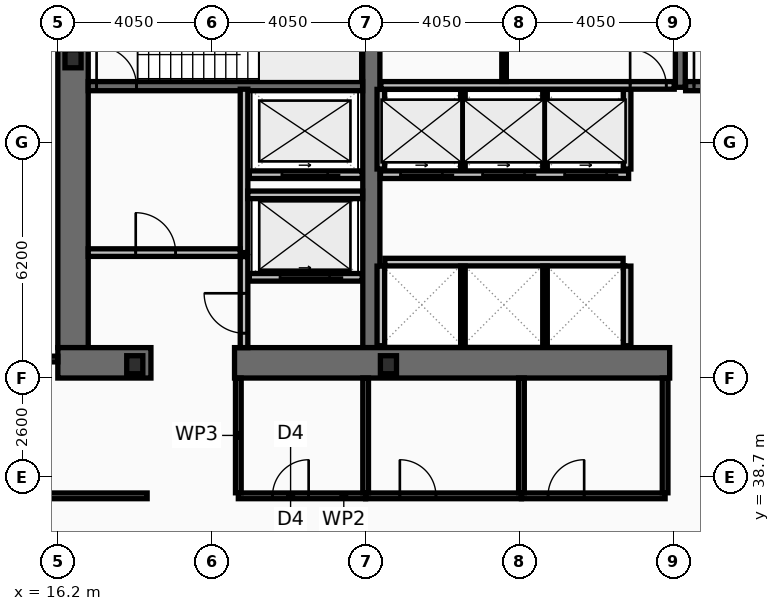
"""IFC4 building model, lengths in metres.
Left out: names, types, materials, properties, quantities, classifications, styles, units other than length and angle.
Written with IfcOpenShell. Run it as: python <this file> out.ifc"""

import sys

from ifc_helpers import new_model, si_unit, direction, frame, frame_2d, origin, origin_2d, place, context, subcontext, project, spatial, rectangle, i_section, extrude, element, fill, save


model = new_model("IFC4")
c1 = context("Model", 3, precision=1e-05, world=origin(), true_north=direction((0.0, 1.0)))
c2 = subcontext(c1, "Body", "Model", "MODEL_VIEW")
j1 = project(units=[si_unit("LENGTHUNIT", "METRE"), si_unit("PLANEANGLEUNIT", "RADIAN")], contexts=[c1])
p1 = place(None, origin())
s1 = spatial("IfcSite", under=j1, at=p1, CompositionType="ELEMENT")
p2 = place(p1, origin())
s2 = spatial("IfcBuilding", under=s1, at=p2, CompositionType="ELEMENT")
p3 = place(p2, frame((0.0, 0.0, 29.8)))
s3 = spatial("IfcBuildingStorey", under=s2, at=p3, CompositionType="ELEMENT", Elevation=29.8)
p4 = place(p3, frame((16.6, 42.1, 0.0), z_axis=(0.0, 0.0, 1.0), x_axis=(0.0, 1.0, 0.0)))
e1 = element("IfcWall", 1, at=p4, inside=s3, PredefinedType="SHEAR", context=c2, shape_type="SweptSolid", body=[
    extrude(rectangle(XDim=10.8, YDim=0.8, at=frame_2d((5.4, 0.0))), origin(), (0.0, 0.0, 1.0), 3.82),
])
p5 = place(p3, frame((24.45, 42.1, 0.0), z_axis=(0.0, 0.0, 1.0), x_axis=(0.0, 1.0, 0.0)))
e2 = element("IfcWall", 2, at=p5, inside=s3, PredefinedType="SHEAR", context=c2, shape_type="SweptSolid", body=[
    extrude(rectangle(XDim=10.8, YDim=0.45, at=frame_2d((5.4, 0.0))), origin(), (0.0, 0.0, 1.0), 3.82),
])
p6 = place(p3, frame((18.65, 41.7, 0.0), z_axis=(0.0, 0.0, 1.0), x_axis=(-1.0, 0.0, 0.0)))
e3 = element("IfcWall", 3, at=p6, inside=s3, PredefinedType="SHEAR", context=c2, shape_type="SweptSolid", body=[
    extrude(rectangle(XDim=2.45, YDim=0.8, at=frame_2d((1.225, 0.0))), origin(), (0.0, 0.0, 1.0), 3.82),
])
p7 = place(p3, frame((32.3, 41.7, 0.0), z_axis=(0.0, 0.0, 1.0), x_axis=(-1.0, 0.0, 0.0)))
e4 = element("IfcWall", 4, at=p7, inside=s3, PredefinedType="SHEAR", context=c2, shape_type="SweptSolid", body=[
    extrude(rectangle(XDim=11.45, YDim=0.8, at=frame_2d((5.725, 0.0))), origin(), (0.0, 0.0, 1.0), 3.82),
])
p8 = place(p3, frame((32.58, 48.95, 0.0), z_axis=(0.0, 0.0, 1.0), x_axis=(0.0, 1.0, 0.0)))
e5 = element("IfcWall", 5, at=p8, inside=s3, PredefinedType="SHEAR", context=c2, shape_type="SweptSolid", body=[
    extrude(rectangle(XDim=3.95, YDim=0.26, at=frame_2d((1.975, 0.0))), origin(), (0.0, 0.0, 1.0), 3.82),
])
p9 = place(p3, frame((17.0, 48.98, 0.0), z_axis=(0.0, 0.0, 1.0), x_axis=(1.0, 0.0, 0.0)))
e6 = element("IfcWall", 6, at=p9, inside=s3, PredefinedType="SHEAR", context=c2, shape_type="SweptSolid", body=[
    extrude(rectangle(XDim=7.22, YDim=0.24, at=frame_2d((3.61, 0.0))), origin(), (0.0, 0.0, 1.0), 3.82),
])
p10 = place(p9, frame((0.22, 0.0, 0.0)))
e7 = element("IfcOpeningElement", 7, at=p10, cuts=e6, PredefinedType="OPENING", context=c2, shape_type="SweptSolid", body=[
    extrude(rectangle(XDim=1.05, YDim=2.15, at=frame_2d((0.525, 1.075))), frame((0.0, 0.13, 0.0), z_axis=(0.0, -1.0, 0.0), x_axis=(1.0, 0.0, 0.0)), (0.0, 0.0, 1.0), 0.26),
])
p11 = place(p3, frame((32.72, 48.98, 0.0), z_axis=(0.0, 0.0, 1.0), x_axis=(1.0, 0.0, 0.0)))
e8 = element("IfcWall", 8, at=p11, inside=s3, PredefinedType="SHEAR", context=c2, shape_type="SweptSolid", body=[
    extrude(rectangle(XDim=7.56, YDim=0.24, at=frame_2d((3.78, 0.0))), origin(), (0.0, 0.0, 1.0), 3.82),
])
p12 = place(p11, frame((0.22, 0.0, 0.0)))
e9 = element("IfcOpeningElement", 9, at=p12, cuts=e8, PredefinedType="OPENING", context=c2, shape_type="SweptSolid", body=[
    extrude(rectangle(XDim=1.05, YDim=2.15, at=frame_2d((0.525, 1.075))), frame((0.0, 0.13, 0.0), z_axis=(0.0, -1.0, 0.0), x_axis=(1.0, 0.0, 0.0)), (0.0, 0.0, 1.0), 0.26),
])
for number, where, z_axis, x_axis in (
    (10, (16.6, 49.7, 0.0), (0.0, 0.0, 1.0), (1.0, 0.0, 0.0)),
    (11, (18.225, 41.65, 0.0), (0.0, 0.0, 1.0), (1.0, 0.0, 0.0)),
    (12, (24.9, 41.65, 0.0), (0.0, 0.0, 1.0), (1.0, 0.0, 0.0)),
):
    element("IfcColumn", number, at=place(p3, frame(where, z_axis=z_axis, x_axis=x_axis)), inside=s3, PredefinedType="COLUMN", context=c2, shape_type="SweptSolid", body=[
        extrude(i_section(OverallWidth=0.424, OverallDepth=0.474, WebThickness=0.048, FlangeThickness=0.077, at=origin_2d()), origin(), (0.0, 0.0, 1.0), 4.0),
    ])
p13 = place(p3, frame((24.21, 43.95, 0.0), z_axis=(0.0, 0.0, 1.0), x_axis=(-1.0, 0.0, 0.0)))
e13 = element("IfcWall", 13, at=p13, inside=s3, PredefinedType="PARTITIONING", context=c2, shape_type="SweptSolid", body=[
    extrude(rectangle(XDim=2.97, YDim=0.2, at=frame_2d((1.485, 0.0))), origin(), (0.0, 0.0, 1.0), 3.82),
])
p14 = place(p13, frame((0.86, 0.0, 0.0)))
e14 = element("IfcOpeningElement", 14, at=p14, cuts=e13, PredefinedType="OPENING", context=c2, shape_type="SweptSolid", body=[
    extrude(rectangle(XDim=1.3, YDim=2.18, at=frame_2d((0.65, 1.09))), frame((0.0, 0.11, 0.0), z_axis=(0.0, -1.0, 0.0), x_axis=(1.0, 0.0, 0.0)), (0.0, 0.0, 1.0), 0.22),
])
p15 = place(p3, frame((24.21, 46.65, 0.0), z_axis=(0.0, 0.0, 1.0), x_axis=(-1.0, 0.0, 0.0)))
e15 = element("IfcWall", 15, at=p15, inside=s3, PredefinedType="PARTITIONING", context=c2, shape_type="SweptSolid", body=[
    extrude(rectangle(XDim=2.97, YDim=0.2, at=frame_2d((1.485, 0.0))), origin(), (0.0, 0.0, 1.0), 3.82),
])
p16 = place(p15, frame((0.91, 0.0, 0.0)))
e16 = element("IfcOpeningElement", 16, at=p16, cuts=e15, PredefinedType="OPENING", context=c2, shape_type="SweptSolid", body=[
    extrude(rectangle(XDim=1.2, YDim=2.18, at=frame_2d((0.6, 1.09))), frame((0.0, 0.11, 0.0), z_axis=(0.0, -1.0, 0.0), x_axis=(1.0, 0.0, 0.0)), (0.0, 0.0, 1.0), 0.22),
])
p17 = place(p3, frame((31.22, 46.65, 0.0), z_axis=(0.0, 0.0, 1.0), x_axis=(-1.0, 0.0, 0.0)))
e17 = element("IfcWall", 17, at=p17, inside=s3, PredefinedType="PARTITIONING", context=c2, shape_type="SweptSolid", body=[
    extrude(rectangle(XDim=6.53, YDim=0.2, at=frame_2d((3.265, 0.0))), origin(), (0.0, 0.0, 1.0), 3.82),
])
p18 = place(p17, frame((4.9, 0.0, 0.0)))
e18 = element("IfcOpeningElement", 18, at=p18, cuts=e17, PredefinedType="OPENING", context=c2, shape_type="SweptSolid", body=[
    extrude(rectangle(XDim=1.1, YDim=2.18, at=frame_2d((0.55, 1.09))), frame((0.0, 0.11, 0.0), z_axis=(0.0, -1.0, 0.0), x_axis=(1.0, 0.0, 0.0)), (0.0, 0.0, 1.0), 0.22),
])
p19 = place(p17, frame((2.74, 0.0, 0.0)))
e19 = element("IfcOpeningElement", 19, at=p19, cuts=e17, PredefinedType="OPENING", context=c2, shape_type="SweptSolid", body=[
    extrude(rectangle(XDim=1.1, YDim=2.18, at=frame_2d((0.55, 1.09))), frame((0.0, 0.11, 0.0), z_axis=(0.0, -1.0, 0.0), x_axis=(1.0, 0.0, 0.0)), (0.0, 0.0, 1.0), 0.22),
])
p20 = place(p17, frame((0.58, 0.0, 0.0)))
e20 = element("IfcOpeningElement", 20, at=p20, cuts=e17, PredefinedType="OPENING", context=c2, shape_type="SweptSolid", body=[
    extrude(rectangle(XDim=1.1, YDim=2.18, at=frame_2d((0.55, 1.09))), frame((0.0, 0.11, 0.0), z_axis=(0.0, -1.0, 0.0), x_axis=(1.0, 0.0, 0.0)), (0.0, 0.0, 1.0), 0.22),
])
p21 = place(p3, frame((21.1, 44.6, 0.0), z_axis=(0.0, 0.0, 1.0), x_axis=(0.0, 1.0, 0.0)))
e21 = element("IfcWall", 21, at=p21, inside=s3, PredefinedType="PARTITIONING", context=c2, shape_type="SweptSolid", body=[
    extrude(rectangle(XDim=4.3, YDim=0.2, at=frame_2d((2.15, 0.0))), origin(), (0.0, 0.0, 1.0), 3.82),
])
p22 = place(p3, frame((17.0, 44.6, 0.0), z_axis=(0.0, 0.0, 1.0), x_axis=(1.0, 0.0, 0.0)))
e22 = element("IfcWall", 22, at=p22, inside=s3, PredefinedType="PARTITIONING", context=c2, shape_type="SweptSolid", body=[
    extrude(rectangle(XDim=4.0, YDim=0.2, at=frame_2d((2.0, 0.0))), origin(), (0.0, 0.0, 1.0), 3.82),
])
p23 = place(p22, frame((1.25, 0.0, 0.0)))
e23 = element("IfcOpeningElement", 23, at=p23, cuts=e22, PredefinedType="OPENING", context=c2, shape_type="SweptSolid", body=[
    extrude(rectangle(XDim=1.05, YDim=2.15, at=frame_2d((0.525, 1.075))), frame((0.0, 0.11, 0.0), z_axis=(0.0, -1.0, 0.0), x_axis=(1.0, 0.0, 0.0)), (0.0, 0.0, 1.0), 0.22),
])
p24 = place(p3, frame((21.2, 46.12, 0.0), z_axis=(0.0, 0.0, 1.0), x_axis=(1.0, 0.0, 0.0)))
e24 = element("IfcWall", 24, at=p24, inside=s3, PredefinedType="PARTITIONING", context=c2, shape_type="SweptSolid", body=[
    extrude(rectangle(XDim=3.02, YDim=0.2, at=frame_2d((1.51, 0.0))), origin(), (0.0, 0.0, 1.0), 3.82),
])
p25 = place(p3, frame((21.1, 42.1, 0.0), z_axis=(0.0, 0.0, 1.0), x_axis=(0.0, 1.0, 0.0)))
e25 = element("IfcWall", 25, at=p25, inside=s3, PredefinedType="PARTITIONING", context=c2, shape_type="SweptSolid", body=[
    extrude(rectangle(XDim=2.395, YDim=0.2, at=frame_2d((1.198, 0.0))), origin(), (0.0, 0.0, 1.0), 3.82),
])
p26 = place(p25, frame((0.38, 0.0, 0.0)))
e26 = element("IfcOpeningElement", 26, at=p26, cuts=e25, PredefinedType="OPENING", context=c2, shape_type="SweptSolid", body=[
    extrude(rectangle(XDim=1.05, YDim=2.15, at=frame_2d((0.525, 1.075))), frame((0.0, 0.11, 0.0), z_axis=(0.0, -1.0, 0.0), x_axis=(1.0, 0.0, 0.0)), (0.0, 0.0, 1.0), 0.22),
])
for number, where, z_axis, x_axis in (
    (27, (24.7, 46.8, 0.0), (0.0, 0.0, 1.0), (0.0, 1.0, 0.0)),
    (28, (31.18, 46.8, 0.0), (0.0, 0.0, 1.0), (0.0, 1.0, 0.0)),
):
    element("IfcWall", number, at=place(p3, frame(where, z_axis=z_axis, x_axis=x_axis)), inside=s3, PredefinedType="PARTITIONING", context=c2, shape_type="SweptSolid", body=[
        extrude(rectangle(XDim=2.095, YDim=0.2, at=frame_2d((1.047, 0.0))), origin(), (0.0, 0.0, 1.0), 3.82),
    ])
for number, where, z_axis, x_axis in (
    (29, (26.86, 46.8, 0.0), (0.0, 0.0, 1.0), (0.0, 1.0, 0.0)),
    (30, (29.02, 46.8, 0.0), (0.0, 0.0, 1.0), (0.0, 1.0, 0.0)),
):
    element("IfcWall", number, at=place(p3, frame(where, z_axis=z_axis, x_axis=x_axis)), inside=s3, PredefinedType="PARTITIONING", context=c2, shape_type="SweptSolid", body=[
        extrude(rectangle(XDim=2.095, YDim=0.12, at=frame_2d((1.047, 0.0))), origin(), (0.0, 0.0, 1.0), 3.82),
    ])
p27 = place(p3, frame((24.805, 44.35, 0.0), z_axis=(0.0, 0.0, 1.0), x_axis=(1.0, 0.0, 0.0)))
e31 = element("IfcWall", 31, at=p27, inside=s3, PredefinedType="PARTITIONING", context=c2, shape_type="SweptSolid", body=[
    extrude(rectangle(XDim=6.27, YDim=0.2, at=frame_2d((3.135, 0.0))), origin(), (0.0, 0.0, 1.0), 3.82),
])
for number, where, z_axis, x_axis in (
    (32, (24.7, 42.15, 0.0), (0.0, 0.0, 1.0), (0.0, 1.0, 0.0)),
    (33, (31.18, 42.15, 0.0), (0.0, 0.0, 1.0), (0.0, 1.0, 0.0)),
):
    element("IfcWall", number, at=place(p3, frame(where, z_axis=z_axis, x_axis=x_axis)), inside=s3, PredefinedType="PARTITIONING", context=c2, shape_type="SweptSolid", body=[
        extrude(rectangle(XDim=2.095, YDim=0.2, at=frame_2d((1.048, 0.0))), origin(), (0.0, 0.0, 1.0), 3.82),
    ])
for number, where, z_axis, x_axis in (
    (34, (26.86, 42.15, 0.0), (0.0, 0.0, 1.0), (0.0, 1.0, 0.0)),
    (35, (29.02, 42.15, 0.0), (0.0, 0.0, 1.0), (0.0, 1.0, 0.0)),
):
    element("IfcWall", number, at=place(p3, frame(where, z_axis=z_axis, x_axis=x_axis)), inside=s3, PredefinedType="PARTITIONING", context=c2, shape_type="SweptSolid", body=[
        extrude(rectangle(XDim=2.095, YDim=0.12, at=frame_2d((1.048, 0.0))), origin(), (0.0, 0.0, 1.0), 3.82),
    ])
p28 = place(p3, frame((24.7, 49.0, 0.0), z_axis=(0.0, 0.0, 1.0), x_axis=(1.0, 0.0, 0.0)))
e36 = element("IfcWall", 36, at=p28, inside=s3, PredefinedType="PARTITIONING", context=c2, shape_type="SweptSolid", body=[
    extrude(rectangle(XDim=7.72, YDim=0.2, at=frame_2d((3.86, 0.0))), origin(), (0.0, 0.0, 1.0), 3.82),
])
p29 = place(p28, frame((6.56, 0.0, 0.0)))
e37 = element("IfcOpeningElement", 37, at=p29, cuts=e36, PredefinedType="OPENING", context=c2, shape_type="SweptSolid", body=[
    extrude(rectangle(XDim=0.95, YDim=2.1, at=frame_2d((0.475, 1.05))), frame((0.0, 0.11, 0.0), z_axis=(0.0, -1.0, 0.0), x_axis=(1.0, 0.0, 0.0)), (0.0, 0.0, 1.0), 0.22),
])
p30 = place(p3, frame((27.942, 49.105, 0.0), z_axis=(0.0, 0.0, 1.0), x_axis=(0.0, 1.0, 0.0)))
e38 = element("IfcWall", 38, at=p30, inside=s3, PredefinedType="PARTITIONING", context=c2, shape_type="SweptSolid", body=[
    extrude(rectangle(XDim=3.69, YDim=0.12, at=frame_2d((1.845, 0.0))), origin(), (0.0, 0.0, 1.0), 3.82),
])
p31 = place(p30, frame((1.05, 0.0, 0.0)))
e39 = element("IfcOpeningElement", 39, at=p31, cuts=e38, PredefinedType="OPENING", context=c2, shape_type="SweptSolid", body=[
    extrude(rectangle(XDim=0.9, YDim=2.05, at=frame_2d((0.45, 1.025))), frame((0.0, 0.07, 0.0), z_axis=(0.0, -1.0, 0.0), x_axis=(1.0, 0.0, 0.0)), (0.0, 0.0, 1.0), 0.14),
])
p32 = place(p3, frame((20.95, 38.2, 0.0), z_axis=(0.0, 0.0, 1.0), x_axis=(1.0, 0.0, 0.0)))
e40 = element("IfcWall", 40, at=p32, inside=s3, PredefinedType="PARTITIONING", context=c2, shape_type="SweptSolid", body=[
    extrude(rectangle(XDim=3.35, YDim=0.15, at=frame_2d((1.675, 0.0))), origin(), (0.0, 0.0, 1.0), 3.82),
])
p33 = place(p32, frame((0.9, 0.0, 0.0)))
e41 = element("IfcOpeningElement", 41, at=p33, cuts=e40, PredefinedType="OPENING", context=c2, shape_type="SweptSolid", body=[
    extrude(rectangle(XDim=0.95, YDim=2.05, at=frame_2d((0.475, 1.025))), frame((0.0, 0.085, 0.0), z_axis=(0.0, -1.0, 0.0), x_axis=(1.0, 0.0, 0.0)), (0.0, 0.0, 1.0), 0.17),
])
p34 = place(p3, frame((24.3, 38.2, 0.0), z_axis=(0.0, 0.0, 1.0), x_axis=(1.0, 0.0, 0.0)))
e42 = element("IfcWall", 42, at=p34, inside=s3, PredefinedType="PARTITIONING", context=c2, shape_type="SweptSolid", body=[
    extrude(rectangle(XDim=4.1, YDim=0.15, at=frame_2d((2.05, 0.0))), origin(), (0.0, 0.0, 1.0), 3.01),
])
p35 = place(p34, frame((0.9, 0.0, 0.0)))
e43 = element("IfcOpeningElement", 43, at=p35, cuts=e42, PredefinedType="OPENING", context=c2, shape_type="SweptSolid", body=[
    extrude(rectangle(XDim=0.95, YDim=2.05, at=frame_2d((0.475, 1.025))), frame((0.0, 0.085, 0.0), z_axis=(0.0, -1.0, 0.0), x_axis=(1.0, 0.0, 0.0)), (0.0, 0.0, 1.0), 0.17),
])
p36 = place(p3, frame((28.4, 38.2, 0.0), z_axis=(0.0, 0.0, 1.0), x_axis=(1.0, 0.0, 0.0)))
e44 = element("IfcWall", 44, at=p36, inside=s3, PredefinedType="PARTITIONING", context=c2, shape_type="SweptSolid", body=[
    extrude(rectangle(XDim=3.78, YDim=0.15, at=frame_2d((1.89, 0.0))), origin(), (0.0, 0.0, 1.0), 3.01),
])
p37 = place(p36, frame((0.7, 0.0, 0.0)))
e45 = element("IfcOpeningElement", 45, at=p37, cuts=e44, PredefinedType="OPENING", context=c2, shape_type="SweptSolid", body=[
    extrude(rectangle(XDim=0.95, YDim=2.05, at=frame_2d((0.475, 1.025))), frame((0.0, 0.085, 0.0), z_axis=(0.0, -1.0, 0.0), x_axis=(1.0, 0.0, 0.0)), (0.0, 0.0, 1.0), 0.17),
])
for number, where, z_axis, x_axis in (
    (46, (20.95, 38.28, 0.0), (0.0, 0.0, 1.0), (0.0, 1.0, 0.0)),
    (47, (24.3, 38.28, 0.0), (0.0, 0.0, 1.0), (0.0, 1.0, 0.0)),
    (48, (28.4, 38.28, 0.0), (0.0, 0.0, 1.0), (0.0, 1.0, 0.0)),
    (49, (32.18, 38.28, 0.0), (0.0, 0.0, 1.0), (0.0, 1.0, 0.0)),
):
    element("IfcWall", number, at=place(p3, frame(where, z_axis=z_axis, x_axis=x_axis)), inside=s3, PredefinedType="PARTITIONING", context=c2, shape_type="SweptSolid", body=[
        extrude(rectangle(XDim=3.02, YDim=0.15, at=frame_2d((1.51, 0.0))), origin(), (0.0, 0.0, 1.0), 3.82),
    ])
p38 = place(p3, frame((2.03, 38.2, 0.0), z_axis=(0.0, 0.0, 1.0), x_axis=(1.0, 0.0, 0.0)))
e50 = element("IfcWall", 50, at=p38, inside=s3, PredefinedType="PARTITIONING", context=c2, shape_type="SweptSolid", body=[
    extrude(rectangle(XDim=16.52, YDim=0.15, at=frame_2d((8.26, 0.0))), origin(), (0.0, 0.0, 1.0), 3.01),
])
p39 = place(p38, frame((12.32, 0.0, 0.0)))
e51 = element("IfcOpeningElement", 51, at=p39, cuts=e50, PredefinedType="OPENING", context=c2, shape_type="SweptSolid", body=[
    extrude(rectangle(XDim=0.95, YDim=2.05, at=frame_2d((0.475, 1.025))), frame((0.0, 0.085, 0.0), z_axis=(0.0, -1.0, 0.0), x_axis=(1.0, 0.0, 0.0)), (0.0, 0.0, 1.0), 0.17),
])
p40 = place(p3, frame((2.095, 41.8, 0.0), z_axis=(0.0, 0.0, 1.0), x_axis=(1.0, 0.0, 0.0)))
e52 = element("IfcWall", 52, at=p40, inside=s3, PredefinedType="PARTITIONING", context=c2, shape_type="SweptSolid", body=[
    extrude(rectangle(XDim=14.105, YDim=0.15, at=frame_2d((7.052, 0.0))), origin(), (0.0, 0.0, 1.0), 3.82),
])
p41 = place(p40, frame((12.32, 0.0, 0.0)))
e53 = element("IfcOpeningElement", 53, at=p41, cuts=e52, PredefinedType="OPENING", context=c2, shape_type="SweptSolid", body=[
    extrude(rectangle(XDim=0.9, YDim=2.05, at=frame_2d((0.45, 1.025))), frame((0.0, 0.085, 0.0), z_axis=(0.0, -1.0, 0.0), x_axis=(1.0, 0.0, 0.0)), (0.0, 0.0, 1.0), 0.17),
])
p42 = place(p10, origin())
e54 = element("IfcDoor", 54, at=p42, inside=s3, OperationType="SINGLE_SWING_LEFT", PredefinedType="DOOR", context=c2, shape_type="SweptSolid", body=[
    extrude(rectangle(XDim=1.05, YDim=2.15, at=frame_2d((0.525, 1.075))), frame((0.0, 0.025, 0.0), z_axis=(0.0, -1.0, 0.0), x_axis=(1.0, 0.0, 0.0)), (0.0, 0.0, 1.0), 0.05),
])
fill(e7, e54)
p43 = place(p12, origin())
e55 = element("IfcDoor", 55, at=p43, inside=s3, OperationType="SINGLE_SWING_LEFT", PredefinedType="DOOR", context=c2, shape_type="SweptSolid", body=[
    extrude(rectangle(XDim=1.05, YDim=2.15, at=frame_2d((0.525, 1.075))), frame((0.0, 0.025, 0.0), z_axis=(0.0, -1.0, 0.0), x_axis=(1.0, 0.0, 0.0)), (0.0, 0.0, 1.0), 0.05),
])
fill(e9, e55)
p44 = place(p14, origin())
e56 = element("IfcDoor", 56, at=p44, inside=s3, OperationType="SLIDING_TO_LEFT", PredefinedType="DOOR", context=c2, shape_type="SweptSolid", body=[
    extrude(rectangle(XDim=1.3, YDim=2.18, at=frame_2d((0.65, 1.09))), frame((0.0, 0.025, 0.0), z_axis=(0.0, -1.0, 0.0), x_axis=(1.0, 0.0, 0.0)), (0.0, 0.0, 1.0), 0.05),
])
fill(e14, e56)
p45 = place(p16, origin())
e57 = element("IfcDoor", 57, at=p45, inside=s3, OperationType="SLIDING_TO_LEFT", PredefinedType="DOOR", context=c2, shape_type="SweptSolid", body=[
    extrude(rectangle(XDim=1.2, YDim=2.18, at=frame_2d((0.6, 1.09))), frame((0.0, 0.025, 0.0), z_axis=(0.0, -1.0, 0.0), x_axis=(1.0, 0.0, 0.0)), (0.0, 0.0, 1.0), 0.05),
])
fill(e16, e57)
p46 = place(p18, origin())
e58 = element("IfcDoor", 58, at=p46, inside=s3, OperationType="SLIDING_TO_LEFT", PredefinedType="DOOR", context=c2, shape_type="SweptSolid", body=[
    extrude(rectangle(XDim=1.1, YDim=2.18, at=frame_2d((0.55, 1.09))), frame((0.0, 0.025, 0.0), z_axis=(0.0, -1.0, 0.0), x_axis=(1.0, 0.0, 0.0)), (0.0, 0.0, 1.0), 0.05),
])
fill(e18, e58)
p47 = place(p19, origin())
e59 = element("IfcDoor", 59, at=p47, inside=s3, OperationType="SLIDING_TO_LEFT", PredefinedType="DOOR", context=c2, shape_type="SweptSolid", body=[
    extrude(rectangle(XDim=1.1, YDim=2.18, at=frame_2d((0.55, 1.09))), frame((0.0, 0.025, 0.0), z_axis=(0.0, -1.0, 0.0), x_axis=(1.0, 0.0, 0.0)), (0.0, 0.0, 1.0), 0.05),
])
fill(e19, e59)
p48 = place(p20, origin())
e60 = element("IfcDoor", 60, at=p48, inside=s3, OperationType="SLIDING_TO_LEFT", PredefinedType="DOOR", context=c2, shape_type="SweptSolid", body=[
    extrude(rectangle(XDim=1.1, YDim=2.18, at=frame_2d((0.55, 1.09))), frame((0.0, 0.025, 0.0), z_axis=(0.0, -1.0, 0.0), x_axis=(1.0, 0.0, 0.0)), (0.0, 0.0, 1.0), 0.05),
])
fill(e20, e60)
p49 = place(p23, origin())
e61 = element("IfcDoor", 61, at=p49, inside=s3, OperationType="SINGLE_SWING_LEFT", PredefinedType="DOOR", context=c2, shape_type="SweptSolid", body=[
    extrude(rectangle(XDim=1.05, YDim=2.15, at=frame_2d((0.525, 1.075))), frame((0.0, 0.025, 0.0), z_axis=(0.0, -1.0, 0.0), x_axis=(1.0, 0.0, 0.0)), (0.0, 0.0, 1.0), 0.05),
])
fill(e23, e61)
p50 = place(p26, origin())
e62 = element("IfcDoor", 62, at=p50, inside=s3, OperationType="SINGLE_SWING_RIGHT", PredefinedType="DOOR", context=c2, shape_type="SweptSolid", body=[
    extrude(rectangle(XDim=1.05, YDim=2.15, at=frame_2d((0.525, 1.075))), frame((0.0, 0.025, 0.0), z_axis=(0.0, -1.0, 0.0), x_axis=(1.0, 0.0, 0.0)), (0.0, 0.0, 1.0), 0.05),
])
fill(e26, e62)
p51 = place(p29, origin())
e63 = element("IfcDoor", 63, at=p51, inside=s3, OperationType="SINGLE_SWING_LEFT", PredefinedType="DOOR", context=c2, shape_type="SweptSolid", body=[
    extrude(rectangle(XDim=0.95, YDim=2.1, at=frame_2d((0.475, 1.05))), frame((0.0, 0.025, 0.0), z_axis=(0.0, -1.0, 0.0), x_axis=(1.0, 0.0, 0.0)), (0.0, 0.0, 1.0), 0.05),
])
fill(e37, e63)
p52 = place(p33, origin())
e64 = element("IfcDoor", 64, at=p52, inside=s3, OperationType="SINGLE_SWING_RIGHT", PredefinedType="DOOR", context=c2, shape_type="SweptSolid", body=[
    extrude(rectangle(XDim=0.95, YDim=2.05, at=frame_2d((0.475, 1.025))), frame((0.0, 0.025, 0.0), z_axis=(0.0, -1.0, 0.0), x_axis=(1.0, 0.0, 0.0)), (0.0, 0.0, 1.0), 0.05),
])
fill(e41, e64)
p53 = place(p35, origin())
e65 = element("IfcDoor", 65, at=p53, inside=s3, OperationType="SINGLE_SWING_LEFT", PredefinedType="DOOR", context=c2, shape_type="SweptSolid", body=[
    extrude(rectangle(XDim=0.95, YDim=2.05, at=frame_2d((0.475, 1.025))), frame((0.0, 0.025, 0.0), z_axis=(0.0, -1.0, 0.0), x_axis=(1.0, 0.0, 0.0)), (0.0, 0.0, 1.0), 0.05),
])
fill(e43, e65)
p54 = place(p37, origin())
e66 = element("IfcDoor", 66, at=p54, inside=s3, OperationType="SINGLE_SWING_RIGHT", PredefinedType="DOOR", context=c2, shape_type="SweptSolid", body=[
    extrude(rectangle(XDim=0.95, YDim=2.05, at=frame_2d((0.475, 1.025))), frame((0.0, 0.025, 0.0), z_axis=(0.0, -1.0, 0.0), x_axis=(1.0, 0.0, 0.0)), (0.0, 0.0, 1.0), 0.05),
])
fill(e45, e66)
save(model, sys.argv[1])
